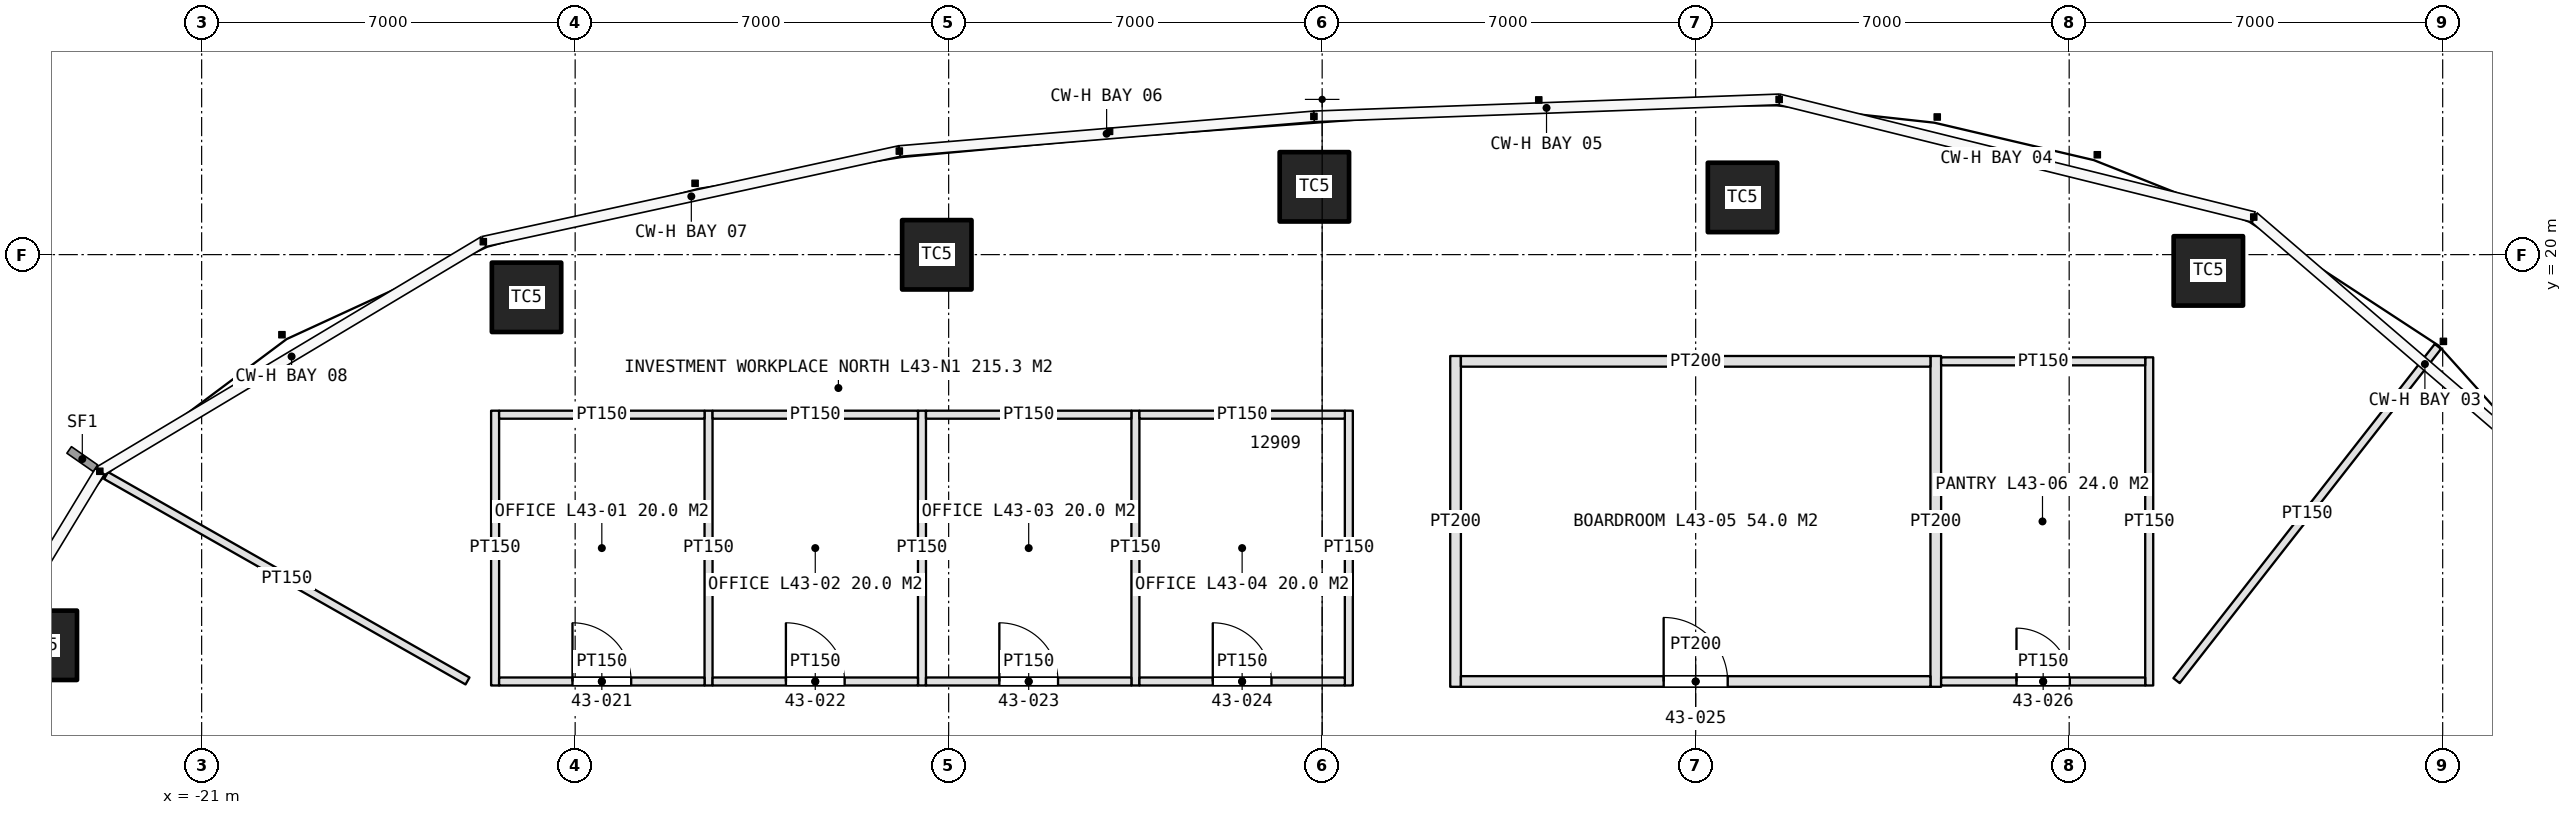
"""IFC4 building model, lengths in metres.
Left out: names, types, materials, properties, quantities, classifications, styles, units other than length and angle.
Written with IfcOpenShell. Run it as: python <this file> out.ifc"""

import sys

from ifc_helpers import new_model, si_unit, direction, frame, frame_2d, origin, origin_2d, place, context, subcontext, project, spatial, rectangle, extrude, element, fill, save


model = new_model("IFC4")
c1 = context("Model", 3, precision=1e-05, world=origin(), true_north=direction((0.0, 1.0)))
c2 = subcontext(c1, "Body", "Model", "MODEL_VIEW")
j1 = project(units=[si_unit("LENGTHUNIT", "METRE"), si_unit("PLANEANGLEUNIT", "RADIAN")], contexts=[c1])
p1 = place(None, origin())
s1 = spatial("IfcSite", under=j1, at=p1, CompositionType="ELEMENT")
p2 = place(p1, origin())
s2 = spatial("IfcBuilding", under=s1, at=p2, CompositionType="ELEMENT")
p3 = place(p2, frame((0.0, 0.0, 199.0)))
s3 = spatial("IfcBuildingStorey", under=s2, at=p3, CompositionType="ELEMENT", Elevation=199.0)
for number, where, z_axis, x_axis in (
    (1, (16.608, 19.695, 0.0), (0.0, 0.0, 1.0), (1.0, 0.0, 0.0)),
    (2, (7.878, 21.072, 0.0), (0.0, 0.0, 1.0), (1.0, 0.0, 0.0)),
    (3, (-0.146, 21.271, 0.0), (0.0, 0.0, 1.0), (1.0, 0.0, 0.0)),
    (4, (-7.222, 19.997, 0.0), (0.0, 0.0, 1.0), (1.0, 0.0, 0.0)),
    (5, (-14.911, 19.2, 0.0), (0.0, 0.0, 1.0), (1.0, 0.0, 0.0)),
    (6, (-23.986, 12.678, 0.0), (0.0, 0.0, 1.0), (1.0, 0.0, 0.0)),
):
    element("IfcColumn", number, at=place(p3, frame(where, z_axis=z_axis, x_axis=x_axis)), inside=s3, PredefinedType="COLUMN", context=c2, shape_type="SweptSolid", body=[
        extrude(rectangle(XDim=1.3, YDim=1.3, at=origin_2d()), origin(), (0.0, 0.0, 1.0), 4.2),
    ])
for number, where, z_axis, x_axis in (
    (7, (-15.5, 11.925, 0.0), (0.0, 0.0, 1.0), (0.0, 1.0, 0.0)),
    (8, (-11.5, 11.925, 0.0), (0.0, 0.0, 1.0), (0.0, 1.0, 0.0)),
    (9, (-7.5, 11.925, 0.0), (0.0, 0.0, 1.0), (0.0, 1.0, 0.0)),
    (10, (-3.5, 11.925, 0.0), (0.0, 0.0, 1.0), (0.0, 1.0, 0.0)),
    (11, (0.5, 11.925, 0.0), (0.0, 0.0, 1.0), (0.0, 1.0, 0.0)),
):
    element("IfcWall", number, at=place(p3, frame(where, z_axis=z_axis, x_axis=x_axis)), inside=s3, PredefinedType="PARTITIONING", context=c2, shape_type="SweptSolid", body=[
        extrude(rectangle(XDim=5.15, YDim=0.15, at=frame_2d((2.575, 0.0))), origin(), (0.0, 0.0, 1.0), 3.0),
    ])
p4 = place(p3, frame((-15.425, 12.0, 0.0), z_axis=(0.0, 0.0, 1.0), x_axis=(1.0, 0.0, 0.0)))
e12 = element("IfcWall", 12, at=p4, inside=s3, PredefinedType="PARTITIONING", context=c2, shape_type="SweptSolid", body=[
    extrude(rectangle(XDim=3.85, YDim=0.15, at=frame_2d((1.925, 0.0))), origin(), (0.0, 0.0, 1.0), 3.0),
])
p5 = place(p4, frame((1.375, 0.0, 0.0)))
e13 = element("IfcOpeningElement", 13, at=p5, cuts=e12, PredefinedType="OPENING", context=c2, shape_type="SweptSolid", body=[
    extrude(rectangle(XDim=1.1, YDim=2.3, at=frame_2d((0.55, 1.15))), frame((0.0, 0.085, 0.0), z_axis=(0.0, -1.0, 0.0), x_axis=(1.0, 0.0, 0.0)), (0.0, 0.0, 1.0), 0.17),
])
p6 = place(p3, frame((-15.425, 17.0, 0.0), z_axis=(0.0, 0.0, 1.0), x_axis=(1.0, 0.0, 0.0)))
e14 = element("IfcWall", 14, at=p6, inside=s3, PredefinedType="PARTITIONING", context=c2, shape_type="SweptSolid", body=[
    extrude(rectangle(XDim=3.85, YDim=0.15, at=frame_2d((1.925, 0.0))), origin(), (0.0, 0.0, 1.0), 3.0),
])
p7 = place(p3, frame((-11.425, 12.0, 0.0), z_axis=(0.0, 0.0, 1.0), x_axis=(1.0, 0.0, 0.0)))
e15 = element("IfcWall", 15, at=p7, inside=s3, PredefinedType="PARTITIONING", context=c2, shape_type="SweptSolid", body=[
    extrude(rectangle(XDim=3.85, YDim=0.15, at=frame_2d((1.925, 0.0))), origin(), (0.0, 0.0, 1.0), 3.0),
])
p8 = place(p7, frame((1.375, 0.0, 0.0)))
e16 = element("IfcOpeningElement", 16, at=p8, cuts=e15, PredefinedType="OPENING", context=c2, shape_type="SweptSolid", body=[
    extrude(rectangle(XDim=1.1, YDim=2.3, at=frame_2d((0.55, 1.15))), frame((0.0, 0.085, 0.0), z_axis=(0.0, -1.0, 0.0), x_axis=(1.0, 0.0, 0.0)), (0.0, 0.0, 1.0), 0.17),
])
p9 = place(p3, frame((-11.425, 17.0, 0.0), z_axis=(0.0, 0.0, 1.0), x_axis=(1.0, 0.0, 0.0)))
e17 = element("IfcWall", 17, at=p9, inside=s3, PredefinedType="PARTITIONING", context=c2, shape_type="SweptSolid", body=[
    extrude(rectangle(XDim=3.85, YDim=0.15, at=frame_2d((1.925, 0.0))), origin(), (0.0, 0.0, 1.0), 3.0),
])
p10 = place(p3, frame((-7.425, 12.0, 0.0), z_axis=(0.0, 0.0, 1.0), x_axis=(1.0, 0.0, 0.0)))
e18 = element("IfcWall", 18, at=p10, inside=s3, PredefinedType="PARTITIONING", context=c2, shape_type="SweptSolid", body=[
    extrude(rectangle(XDim=3.85, YDim=0.15, at=frame_2d((1.925, 0.0))), origin(), (0.0, 0.0, 1.0), 3.0),
])
p11 = place(p10, frame((1.375, 0.0, 0.0)))
e19 = element("IfcOpeningElement", 19, at=p11, cuts=e18, PredefinedType="OPENING", context=c2, shape_type="SweptSolid", body=[
    extrude(rectangle(XDim=1.1, YDim=2.3, at=frame_2d((0.55, 1.15))), frame((0.0, 0.085, 0.0), z_axis=(0.0, -1.0, 0.0), x_axis=(1.0, 0.0, 0.0)), (0.0, 0.0, 1.0), 0.17),
])
p12 = place(p3, frame((-7.425, 17.0, 0.0), z_axis=(0.0, 0.0, 1.0), x_axis=(1.0, 0.0, 0.0)))
e20 = element("IfcWall", 20, at=p12, inside=s3, PredefinedType="PARTITIONING", context=c2, shape_type="SweptSolid", body=[
    extrude(rectangle(XDim=3.85, YDim=0.15, at=frame_2d((1.925, 0.0))), origin(), (0.0, 0.0, 1.0), 3.0),
])
p13 = place(p3, frame((-3.425, 12.0, 0.0), z_axis=(0.0, 0.0, 1.0), x_axis=(1.0, 0.0, 0.0)))
e21 = element("IfcWall", 21, at=p13, inside=s3, PredefinedType="PARTITIONING", context=c2, shape_type="SweptSolid", body=[
    extrude(rectangle(XDim=3.85, YDim=0.15, at=frame_2d((1.925, 0.0))), origin(), (0.0, 0.0, 1.0), 3.0),
])
p14 = place(p13, frame((1.375, 0.0, 0.0)))
e22 = element("IfcOpeningElement", 22, at=p14, cuts=e21, PredefinedType="OPENING", context=c2, shape_type="SweptSolid", body=[
    extrude(rectangle(XDim=1.1, YDim=2.3, at=frame_2d((0.55, 1.15))), frame((0.0, 0.085, 0.0), z_axis=(0.0, -1.0, 0.0), x_axis=(1.0, 0.0, 0.0)), (0.0, 0.0, 1.0), 0.17),
])
p15 = place(p3, frame((-3.425, 17.0, 0.0), z_axis=(0.0, 0.0, 1.0), x_axis=(1.0, 0.0, 0.0)))
e23 = element("IfcWall", 23, at=p15, inside=s3, PredefinedType="PARTITIONING", context=c2, shape_type="SweptSolid", body=[
    extrude(rectangle(XDim=3.85, YDim=0.15, at=frame_2d((1.925, 0.0))), origin(), (0.0, 0.0, 1.0), 3.0),
])
for number, where, z_axis, x_axis in (
    (24, (2.5, 11.9, 0.0), (0.0, 0.0, 1.0), (0.0, 1.0, 0.0)),
    (25, (11.5, 11.9, 0.0), (0.0, 0.0, 1.0), (0.0, 1.0, 0.0)),
):
    element("IfcWall", number, at=place(p3, frame(where, z_axis=z_axis, x_axis=x_axis)), inside=s3, PredefinedType="PARTITIONING", context=c2, shape_type="SweptSolid", body=[
        extrude(rectangle(XDim=6.2, YDim=0.2, at=frame_2d((3.1, 0.0))), origin(), (0.0, 0.0, 1.0), 3.0),
    ])
p16 = place(p3, frame((15.5, 11.925, 0.0), z_axis=(0.0, 0.0, 1.0), x_axis=(0.0, 1.0, 0.0)))
e26 = element("IfcWall", 26, at=p16, inside=s3, PredefinedType="PARTITIONING", context=c2, shape_type="SweptSolid", body=[
    extrude(rectangle(XDim=6.15, YDim=0.15, at=frame_2d((3.075, 0.0))), origin(), (0.0, 0.0, 1.0), 3.0),
])
p17 = place(p3, frame((2.6, 12.0, 0.0), z_axis=(0.0, 0.0, 1.0), x_axis=(1.0, 0.0, 0.0)))
e27 = element("IfcWall", 27, at=p17, inside=s3, PredefinedType="PARTITIONING", context=c2, shape_type="SweptSolid", body=[
    extrude(rectangle(XDim=8.8, YDim=0.2, at=frame_2d((4.4, 0.0))), origin(), (0.0, 0.0, 1.0), 3.0),
])
p18 = place(p17, frame((3.8, 0.0, 0.0)))
e28 = element("IfcOpeningElement", 28, at=p18, cuts=e27, PredefinedType="OPENING", context=c2, shape_type="SweptSolid", body=[
    extrude(rectangle(XDim=1.2, YDim=2.4, at=frame_2d((0.6, 1.2))), frame((0.0, 0.11, 0.0), z_axis=(0.0, -1.0, 0.0), x_axis=(1.0, 0.0, 0.0)), (0.0, 0.0, 1.0), 0.22),
])
p19 = place(p3, frame((2.6, 18.0, 0.0), z_axis=(0.0, 0.0, 1.0), x_axis=(1.0, 0.0, 0.0)))
e29 = element("IfcWall", 29, at=p19, inside=s3, PredefinedType="PARTITIONING", context=c2, shape_type="SweptSolid", body=[
    extrude(rectangle(XDim=8.8, YDim=0.2, at=frame_2d((4.4, 0.0))), origin(), (0.0, 0.0, 1.0), 3.0),
])
p20 = place(p3, frame((11.6, 12.0, 0.0), z_axis=(0.0, 0.0, 1.0), x_axis=(1.0, 0.0, 0.0)))
e30 = element("IfcWall", 30, at=p20, inside=s3, PredefinedType="PARTITIONING", context=c2, shape_type="SweptSolid", body=[
    extrude(rectangle(XDim=3.825, YDim=0.15, at=frame_2d((1.913, 0.0))), origin(), (0.0, 0.0, 1.0), 3.0),
])
p21 = place(p20, frame((1.413, 0.0, 0.0)))
e31 = element("IfcOpeningElement", 31, at=p21, cuts=e30, PredefinedType="OPENING", context=c2, shape_type="SweptSolid", body=[
    extrude(rectangle(XDim=1.0, YDim=2.2, at=frame_2d((0.5, 1.1))), frame((0.0, 0.085, 0.0), z_axis=(0.0, -1.0, 0.0), x_axis=(1.0, 0.0, 0.0)), (0.0, 0.0, 1.0), 0.17),
])
p22 = place(p3, frame((11.6, 18.0, 0.0), z_axis=(0.0, 0.0, 1.0), x_axis=(1.0, 0.0, 0.0)))
e32 = element("IfcWall", 32, at=p22, inside=s3, PredefinedType="PARTITIONING", context=c2, shape_type="SweptSolid", body=[
    extrude(rectangle(XDim=3.825, YDim=0.15, at=frame_2d((1.913, 0.0))), origin(), (0.0, 0.0, 1.0), 3.0),
])
p23 = place(p3, frame((-16.017, 12.01, 0.0), z_axis=(0.0, 0.0, 1.0), x_axis=(-0.869357432803, 0.494183826151, 0.0)))
e33 = element("IfcWall", 33, at=p23, inside=s3, PredefinedType="PARTITIONING", context=c2, shape_type="SweptSolid", body=[
    extrude(rectangle(XDim=7.791, YDim=0.15, at=frame_2d((3.896, 0.0))), origin(), (0.0, 0.0, 1.0), 3.0),
])
p24 = place(p3, frame((16.012, 12.016, 0.0), z_axis=(0.0, 0.0, 1.0), x_axis=(0.616030058222, 0.787722646219, 0.0)))
e34 = element("IfcWall", 34, at=p24, inside=s3, PredefinedType="PARTITIONING", context=c2, shape_type="SweptSolid", body=[
    extrude(rectangle(XDim=7.952, YDim=0.15, at=frame_2d((3.976, 0.0))), origin(), (0.0, 0.0, 1.0), 3.0),
])
p25 = place(p5, origin())
e35 = element("IfcDoor", 35, at=p25, inside=s3, OperationType="SINGLE_SWING_LEFT", PredefinedType="DOOR", context=c2, shape_type="SweptSolid", body=[
    extrude(rectangle(XDim=1.1, YDim=2.3, at=frame_2d((0.55, 1.15))), frame((0.0, 0.025, 0.0), z_axis=(0.0, -1.0, 0.0), x_axis=(1.0, 0.0, 0.0)), (0.0, 0.0, 1.0), 0.05),
])
fill(e13, e35)
p26 = place(p8, origin())
e36 = element("IfcDoor", 36, at=p26, inside=s3, OperationType="SINGLE_SWING_LEFT", PredefinedType="DOOR", context=c2, shape_type="SweptSolid", body=[
    extrude(rectangle(XDim=1.1, YDim=2.3, at=frame_2d((0.55, 1.15))), frame((0.0, 0.025, 0.0), z_axis=(0.0, -1.0, 0.0), x_axis=(1.0, 0.0, 0.0)), (0.0, 0.0, 1.0), 0.05),
])
fill(e16, e36)
p27 = place(p11, origin())
e37 = element("IfcDoor", 37, at=p27, inside=s3, OperationType="SINGLE_SWING_LEFT", PredefinedType="DOOR", context=c2, shape_type="SweptSolid", body=[
    extrude(rectangle(XDim=1.1, YDim=2.3, at=frame_2d((0.55, 1.15))), frame((0.0, 0.025, 0.0), z_axis=(0.0, -1.0, 0.0), x_axis=(1.0, 0.0, 0.0)), (0.0, 0.0, 1.0), 0.05),
])
fill(e19, e37)
p28 = place(p14, origin())
e38 = element("IfcDoor", 38, at=p28, inside=s3, OperationType="SINGLE_SWING_LEFT", PredefinedType="DOOR", context=c2, shape_type="SweptSolid", body=[
    extrude(rectangle(XDim=1.1, YDim=2.3, at=frame_2d((0.55, 1.15))), frame((0.0, 0.025, 0.0), z_axis=(0.0, -1.0, 0.0), x_axis=(1.0, 0.0, 0.0)), (0.0, 0.0, 1.0), 0.05),
])
fill(e22, e38)
p29 = place(p18, origin())
e39 = element("IfcDoor", 39, at=p29, inside=s3, OperationType="SINGLE_SWING_LEFT", PredefinedType="DOOR", context=c2, shape_type="SweptSolid", body=[
    extrude(rectangle(XDim=1.2, YDim=2.4, at=frame_2d((0.6, 1.2))), frame((0.0, 0.025, 0.0), z_axis=(0.0, -1.0, 0.0), x_axis=(1.0, 0.0, 0.0)), (0.0, 0.0, 1.0), 0.05),
])
fill(e28, e39)
p30 = place(p21, origin())
e40 = element("IfcDoor", 40, at=p30, inside=s3, OperationType="SINGLE_SWING_LEFT", PredefinedType="DOOR", context=c2, shape_type="SweptSolid", body=[
    extrude(rectangle(XDim=1.0, YDim=2.2, at=frame_2d((0.5, 1.1))), frame((0.0, 0.025, 0.0), z_axis=(0.0, -1.0, 0.0), x_axis=(1.0, 0.0, 0.0)), (0.0, 0.0, 1.0), 0.05),
])
fill(e31, e40)
save(model, sys.argv[1])
